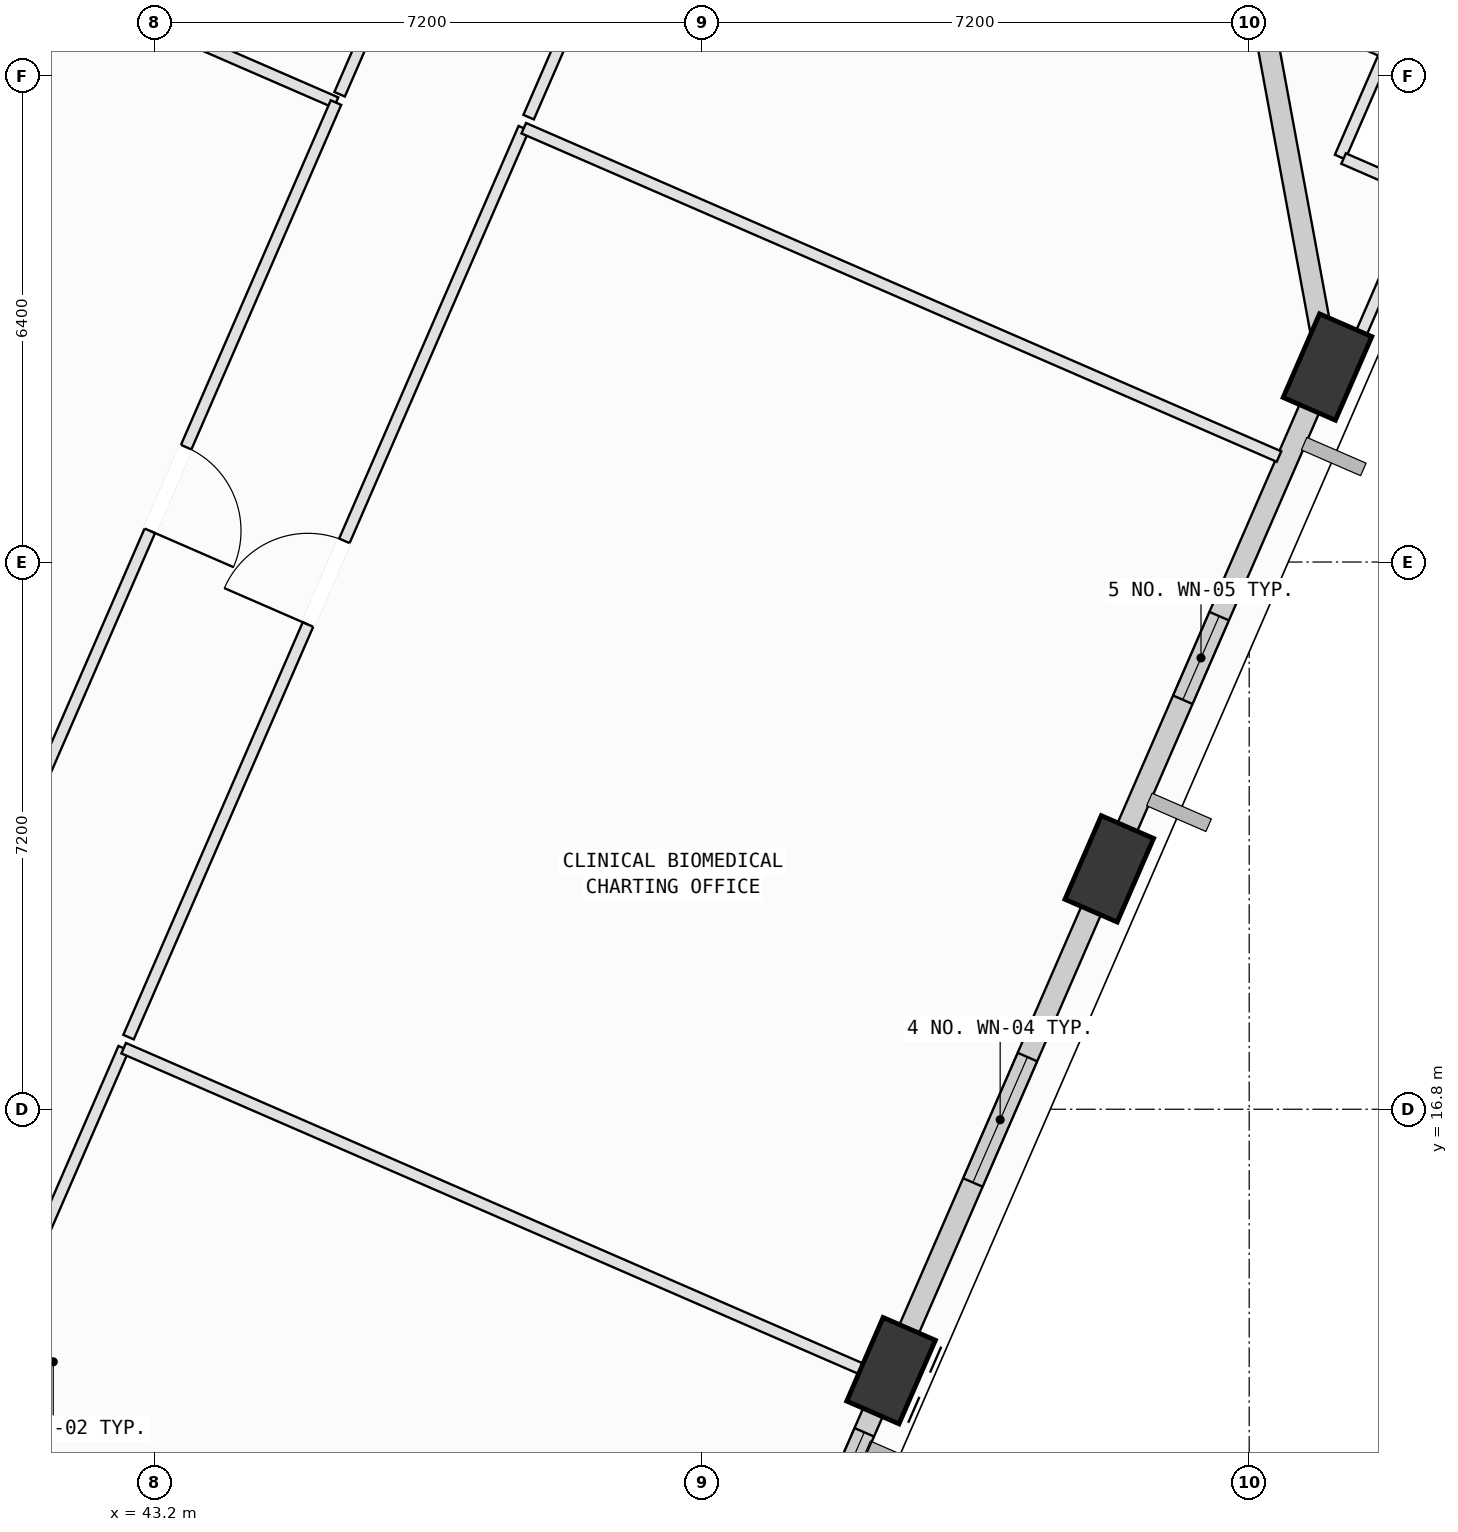
"""IFC4 building model, lengths in metres.
Left out: names, types, materials, properties, quantities, classifications, styles, units other than length and angle.
Written with IfcOpenShell. Run it as: python <this file> out.ifc"""

import sys

from ifc_helpers import new_model, si_unit, direction, frame, frame_2d, origin, origin_2d, place, context, subcontext, project, spatial, rectangle, extrude, element, fill, save


model = new_model("IFC4")
c1 = context("Model", 3, precision=1e-05, world=origin(), true_north=direction((0.0, 1.0)))
c2 = subcontext(c1, "Body", "Model", "MODEL_VIEW")
j1 = project(units=[si_unit("LENGTHUNIT", "METRE"), si_unit("PLANEANGLEUNIT", "RADIAN")], contexts=[c1])
p1 = place(None, origin())
s1 = spatial("IfcSite", under=j1, at=p1, CompositionType="ELEMENT")
p2 = place(p1, origin())
s2 = spatial("IfcBuilding", under=s1, at=p2, CompositionType="ELEMENT")
p3 = place(p2, frame((0.0, 0.0, 308.6)))
s3 = spatial("IfcBuildingStorey", under=s2, at=p3, CompositionType="ELEMENT", Elevation=308.6)
for number, where, z_axis, x_axis in (
    (1, (52.888, 13.36, 0.002), (0.0, 0.0, 1.0), (0.399, 0.917, 0.0)),
    (2, (55.759, 19.963, 0.002), (0.0, 0.0, 1.0), (0.399, 0.917, 0.0)),
    (3, (58.63, 26.566, 0.002), (0.0, 0.0, 1.0), (0.399, 0.917, 0.0)),
):
    element("IfcColumn", number, at=place(p3, frame(where, z_axis=z_axis, x_axis=x_axis)), inside=s3, PredefinedType="COLUMN", context=c2, shape_type="SweptSolid", body=[
        extrude(rectangle(XDim=1.2, YDim=0.75, at=origin_2d()), origin(), (0.0, 0.0, 1.0), 3.996),
    ])
p4 = place(p3, frame((52.729, 12.996, 0.0), z_axis=(0.0, 0.0, 1.0), x_axis=(-0.398744230651, -0.917062178112, 0.0)))
e4 = element("IfcWall", 4, at=p4, inside=s3, PredefinedType="SOLIDWALL", context=c2, shape_type="SweptSolid", body=[
    extrude(rectangle(XDim=6.405, YDim=0.28, at=frame_2d((3.203, 0.0))), origin(), (0.0, 0.0, 1.0), 3.265),
])
p5 = place(p4, frame((2.502, 0.0, 0.75)))
e5 = element("IfcOpeningElement", 5, at=p5, cuts=e4, PredefinedType="OPENING", context=c2, shape_type="SweptSolid", body=[
    extrude(rectangle(XDim=1.4, YDim=1.85, at=frame_2d((0.7, 0.925))), frame((0.0, 0.15, 0.0), z_axis=(0.0, -1.0, 0.0), x_axis=(1.0, 0.0, 0.0)), (0.0, 0.0, 1.0), 0.3),
])
p6 = place(p4, frame((0.486, 0.0, 0.75)))
e6 = element("IfcOpeningElement", 6, at=p6, cuts=e4, PredefinedType="OPENING", context=c2, shape_type="SweptSolid", body=[
    extrude(rectangle(XDim=1.4, YDim=1.85, at=frame_2d((0.7, 0.925))), frame((0.0, 0.15, 0.0), z_axis=(0.0, -1.0, 0.0), x_axis=(1.0, 0.0, 0.0)), (0.0, 0.0, 1.0), 0.3),
])
p7 = place(p3, frame((55.601, 19.598, 0.0), z_axis=(0.0, 0.0, 1.0), x_axis=(-0.398744230651, -0.917062178112, 0.0)))
e7 = element("IfcWall", 7, at=p7, inside=s3, PredefinedType="SOLIDWALL", context=c2, shape_type="SweptSolid", body=[
    extrude(rectangle(XDim=6.405, YDim=0.28, at=frame_2d((3.203, 0.0))), origin(), (0.0, 0.0, 1.0), 3.265),
])
p8 = place(p7, frame((2.302, 0.0, 0.75)))
e8 = element("IfcOpeningElement", 8, at=p8, cuts=e7, PredefinedType="OPENING", context=c2, shape_type="SweptSolid", body=[
    extrude(rectangle(XDim=1.8, YDim=2.05, at=frame_2d((0.9, 1.025))), frame((0.0, 0.15, 0.0), z_axis=(0.0, -1.0, 0.0), x_axis=(1.0, 0.0, 0.0)), (0.0, 0.0, 1.0), 0.3),
])
p9 = place(p3, frame((58.472, 26.201, 0.0), z_axis=(0.0, 0.0, 1.0), x_axis=(-0.398776286617, -0.917048239316, 0.0)))
e9 = element("IfcWall", 9, at=p9, inside=s3, PredefinedType="SOLIDWALL", context=c2, shape_type="SweptSolid", body=[
    extrude(rectangle(XDim=6.405, YDim=0.28, at=frame_2d((3.203, 0.0))), origin(), (0.0, 0.0, 1.0), 3.265),
])
p10 = place(p9, frame((3.176, 0.0, 0.75)))
e10 = element("IfcOpeningElement", 10, at=p10, cuts=e9, PredefinedType="OPENING", context=c2, shape_type="SweptSolid", body=[
    extrude(rectangle(XDim=1.2, YDim=1.75, at=frame_2d((0.6, 0.875))), frame((0.0, 0.15, 0.0), z_axis=(0.0, -1.0, 0.0), x_axis=(1.0, 0.0, 0.0)), (0.0, 0.0, 1.0), 0.3),
])
p11 = place(p3, frame((57.598, 32.162, 0.0), z_axis=(0.0, 0.0, 1.0), x_axis=(0.181421889976, -0.983405357845, 0.0)))
e11 = element("IfcWall", 11, at=p11, inside=s3, PredefinedType="SOLIDWALL", context=c2, shape_type="SweptSolid", body=[
    extrude(rectangle(XDim=5.293, YDim=0.28, at=frame_2d((2.646, 0.0))), origin(), (0.0, 0.0, 1.0), 3.265),
])
p12 = place(p3, frame((39.48, 9.984, 0.0), z_axis=(0.0, 0.0, 1.0), x_axis=(0.398659488131, 0.917099020021, 0.0)))
e12 = element("IfcWall", 12, at=p12, inside=s3, PredefinedType="PARTITIONING", context=c2, shape_type="SweptSolid", body=[
    extrude(rectangle(XDim=8.308, YDim=0.15, at=frame_2d((4.154, 0.0))), origin(), (0.0, 0.0, 1.0), 3.78),
])
p13 = place(p12, frame((3.554, 0.0, 0.0)))
e13 = element("IfcOpeningElement", 13, at=p13, cuts=e12, PredefinedType="OPENING", context=c2, shape_type="SweptSolid", body=[
    extrude(rectangle(XDim=1.2, YDim=2.15, at=frame_2d((0.6, 1.075))), frame((0.0, 0.085, 0.0), z_axis=(0.0, -1.0, 0.0), x_axis=(1.0, 0.0, 0.0)), (0.0, 0.0, 1.0), 0.17),
])
p14 = place(p3, frame((42.792, 17.603, 0.0), z_axis=(0.0, 0.0, 1.0), x_axis=(0.917063112739, -0.398742081117, 0.0)))
e14 = element("IfcWall", 14, at=p14, inside=s3, PredefinedType="PARTITIONING", context=c2, shape_type="SweptSolid", body=[
    extrude(rectangle(XDim=11.18, YDim=0.15, at=frame_2d((5.59, 0.0))), origin(), (0.0, 0.0, 1.0), 3.78),
])
p15 = place(p3, frame((42.856, 17.749, 0.0), z_axis=(0.0, 0.0, 1.0), x_axis=(0.398751440491, 0.917059043195, 0.0)))
e15 = element("IfcWall", 15, at=p15, inside=s3, PredefinedType="PARTITIONING", context=c2, shape_type="SweptSolid", body=[
    extrude(rectangle(XDim=13.041, YDim=0.15, at=frame_2d((6.52, 0.0))), origin(), (0.0, 0.0, 1.0), 3.78),
])
p16 = place(p15, frame((5.92, 0.0, 0.0)))
e16 = element("IfcOpeningElement", 16, at=p16, cuts=e15, PredefinedType="OPENING", context=c2, shape_type="SweptSolid", body=[
    extrude(rectangle(XDim=1.2, YDim=2.15, at=frame_2d((0.6, 1.075))), frame((0.0, 0.085, 0.0), z_axis=(0.0, -1.0, 0.0), x_axis=(1.0, 0.0, 0.0)), (0.0, 0.0, 1.0), 0.17),
])
p17 = place(p3, frame((48.056, 29.708, 0.0), z_axis=(0.0, 0.0, 1.0), x_axis=(0.917068265028, -0.398730231207, 0.0)))
e17 = element("IfcWall", 17, at=p17, inside=s3, PredefinedType="PARTITIONING", context=c2, shape_type="SweptSolid", body=[
    extrude(rectangle(XDim=10.834, YDim=0.15, at=frame_2d((5.417, 0.0))), origin(), (0.0, 0.0, 1.0), 3.78),
])
p18 = place(p3, frame((56.129, 20.236, 0.0), z_axis=(0.0, 0.0, 1.0), x_axis=(-0.398658726612, -0.91709935105, 0.0)))
e18 = element("IfcWall", 18, at=p18, inside=s3, PredefinedType="PARTITIONING", context=c2, shape_type="SweptSolid", body=[
    extrude(rectangle(XDim=0.795, YDim=0.15, at=frame_2d((0.397, 0.0))), origin(), (0.0, 0.0, 1.0), 3.265),
])
p19 = place(p3, frame((59.394, 30.704, 0.0), z_axis=(0.0, 0.0, 1.0), x_axis=(-0.398904712107, -0.916992383097, 0.0)))
e19 = element("IfcWall", 19, at=p19, inside=s3, PredefinedType="PARTITIONING", context=c2, shape_type="SweptSolid", body=[
    extrude(rectangle(XDim=1.5, YDim=0.15, at=frame_2d((0.75, 0.0))), origin(), (0.0, 0.0, 1.0), 3.78),
])
p20 = place(p3, frame((58.842, 29.309, 0.0), z_axis=(0.0, 0.0, 1.0), x_axis=(0.916815661373, -0.399310709926, 0.0)))
e20 = element("IfcWall", 20, at=p20, inside=s3, PredefinedType="PARTITIONING", context=c2, shape_type="SweptSolid", body=[
    extrude(rectangle(XDim=1.13, YDim=0.15, at=frame_2d((0.565, 0.0))), origin(), (0.0, 0.0, 1.0), 3.78),
])
p21 = place(p3, frame((59.858, 28.812, 0.0), z_axis=(0.0, 0.0, 1.0), x_axis=(-0.399092651862, -0.916910603728, 0.0)))
e21 = element("IfcWall", 21, at=p21, inside=s3, PredefinedType="PARTITIONING", context=c2, shape_type="SweptSolid", body=[
    extrude(rectangle(XDim=2.947, YDim=0.15, at=frame_2d((1.473, 0.0))), origin(), (0.0, 0.0, 1.0), 3.265),
])
p22 = place(p3, frame((48.12, 29.854, 0.0), z_axis=(0.0, 0.0, 1.0), x_axis=(0.398700984872, 0.917080980428, 0.0)))
e22 = element("IfcWall", 22, at=p22, inside=s3, PredefinedType="PARTITIONING", context=c2, shape_type="SweptSolid", body=[
    extrude(rectangle(XDim=6.395, YDim=0.15, at=frame_2d((3.198, 0.0))), origin(), (0.0, 0.0, 1.0), 2.765),
])
p23 = place(p22, frame((2.598, 0.0, 0.0)))
e23 = element("IfcOpeningElement", 23, at=p23, cuts=e22, PredefinedType="OPENING", context=c2, shape_type="SweptSolid", body=[
    extrude(rectangle(XDim=1.2, YDim=2.15, at=frame_2d((0.6, 1.075))), frame((0.0, 0.085, 0.0), z_axis=(0.0, -1.0, 0.0), x_axis=(1.0, 0.0, 0.0)), (0.0, 0.0, 1.0), 0.17),
])
p24 = place(p3, frame((58.064, 31.283, 0.0), z_axis=(0.0, 0.0, 1.0), x_axis=(0.91691198731, -0.399089473085, 0.0)))
e24 = element("IfcWall", 24, at=p24, inside=s3, PredefinedType="PARTITIONING", context=c2, shape_type="SweptSolid", body=[
    extrude(rectangle(XDim=1.4, YDim=0.15, at=frame_2d((0.7, 0.0))), origin(), (0.0, 0.0, 1.0), 3.78),
])
p25 = place(p3, frame((38.767, 33.01, 0.0), z_axis=(0.0, 0.0, 1.0), x_axis=(0.917030896956, -0.398816165707, 0.0)))
e25 = element("IfcWall", 25, at=p25, inside=s3, PredefinedType="PARTITIONING", context=c2, shape_type="SweptSolid", body=[
    extrude(rectangle(XDim=7.435, YDim=0.15, at=frame_2d((3.717, 0.0))), origin(), (0.0, 0.0, 1.0), 3.78),
])
p26 = place(p3, frame((45.585, 30.045, 0.0), z_axis=(0.0, 0.0, 1.0), x_axis=(-0.398687458661, -0.91708686083, 0.0)))
e26 = element("IfcWall", 26, at=p26, inside=s3, PredefinedType="PARTITIONING", context=c2, shape_type="SweptSolid", body=[
    extrude(rectangle(XDim=11.086, YDim=0.15, at=frame_2d((5.543, 0.0))), origin(), (0.0, 0.0, 1.0), 2.765),
])
p27 = place(p26, frame((4.943, 0.0, 0.0)))
e27 = element("IfcOpeningElement", 27, at=p27, cuts=e26, PredefinedType="OPENING", context=c2, shape_type="SweptSolid", body=[
    extrude(rectangle(XDim=1.2, YDim=2.15, at=frame_2d((0.6, 1.075))), frame((0.0, 0.085, 0.0), z_axis=(0.0, -1.0, 0.0), x_axis=(1.0, 0.0, 0.0)), (0.0, 0.0, 1.0), 0.17),
])
p28 = place(p3, frame((48.222, 36.108, 0.0), z_axis=(0.0, 0.0, 1.0), x_axis=(-0.398811373886, -0.9170329809, 0.0)))
e28 = element("IfcWall", 28, at=p28, inside=s3, PredefinedType="PARTITIONING", context=c2, shape_type="SweptSolid", body=[
    extrude(rectangle(XDim=6.491, YDim=0.15, at=frame_2d((3.246, 0.0))), origin(), (0.0, 0.0, 1.0), 2.765),
])
p29 = place(p28, frame((2.646, 0.0, 0.0)))
e29 = element("IfcOpeningElement", 29, at=p29, cuts=e28, PredefinedType="OPENING", context=c2, shape_type="SweptSolid", body=[
    extrude(rectangle(XDim=1.2, YDim=2.15, at=frame_2d((0.6, 1.075))), frame((0.0, 0.085, 0.0), z_axis=(0.0, -1.0, 0.0), x_axis=(1.0, 0.0, 0.0)), (0.0, 0.0, 1.0), 0.17),
])
p30 = place(p6, origin())
e30 = element("IfcWindow", 30, at=p30, inside=s3, PartitioningType="SINGLE_PANEL", PredefinedType="WINDOW", context=c2, shape_type="SweptSolid", body=[
    extrude(rectangle(XDim=1.4, YDim=1.85, at=frame_2d((0.7, 0.925))), frame((0.0, 0.03, 0.0), z_axis=(0.0, -1.0, 0.0), x_axis=(1.0, 0.0, 0.0)), (0.0, 0.0, 1.0), 0.06),
])
fill(e6, e30)
p31 = place(p8, origin())
e31 = element("IfcWindow", 31, at=p31, inside=s3, PartitioningType="SINGLE_PANEL", PredefinedType="WINDOW", context=c2, shape_type="SweptSolid", body=[
    extrude(rectangle(XDim=1.8, YDim=2.05, at=frame_2d((0.9, 1.025))), frame((0.0, 0.03, 0.0), z_axis=(0.0, -1.0, 0.0), x_axis=(1.0, 0.0, 0.0)), (0.0, 0.0, 1.0), 0.06),
])
fill(e8, e31)
p32 = place(p10, origin())
e32 = element("IfcWindow", 32, at=p32, inside=s3, PartitioningType="SINGLE_PANEL", PredefinedType="WINDOW", context=c2, shape_type="SweptSolid", body=[
    extrude(rectangle(XDim=1.2, YDim=1.75, at=frame_2d((0.6, 0.875))), frame((0.0, 0.03, 0.0), z_axis=(0.0, -1.0, 0.0), x_axis=(1.0, 0.0, 0.0)), (0.0, 0.0, 1.0), 0.06),
])
fill(e10, e32)
p33 = place(p16, origin())
e33 = element("IfcDoor", 33, at=p33, inside=s3, OperationType="SINGLE_SWING_LEFT", PredefinedType="DOOR", context=c2, shape_type="SweptSolid", body=[
    extrude(rectangle(XDim=1.2, YDim=2.15, at=frame_2d((0.6, 1.075))), frame((0.0, 0.025, 0.0), z_axis=(0.0, -1.0, 0.0), x_axis=(1.0, 0.0, 0.0)), (0.0, 0.0, 1.0), 0.05),
])
fill(e16, e33)
p34 = place(p27, origin())
e34 = element("IfcDoor", 34, at=p34, inside=s3, OperationType="SINGLE_SWING_RIGHT", PredefinedType="DOOR", context=c2, shape_type="SweptSolid", body=[
    extrude(rectangle(XDim=1.2, YDim=2.15, at=frame_2d((0.6, 1.075))), frame((0.0, 0.025, 0.0), z_axis=(0.0, -1.0, 0.0), x_axis=(1.0, 0.0, 0.0)), (0.0, 0.0, 1.0), 0.05),
])
fill(e27, e34)
save(model, sys.argv[1])
